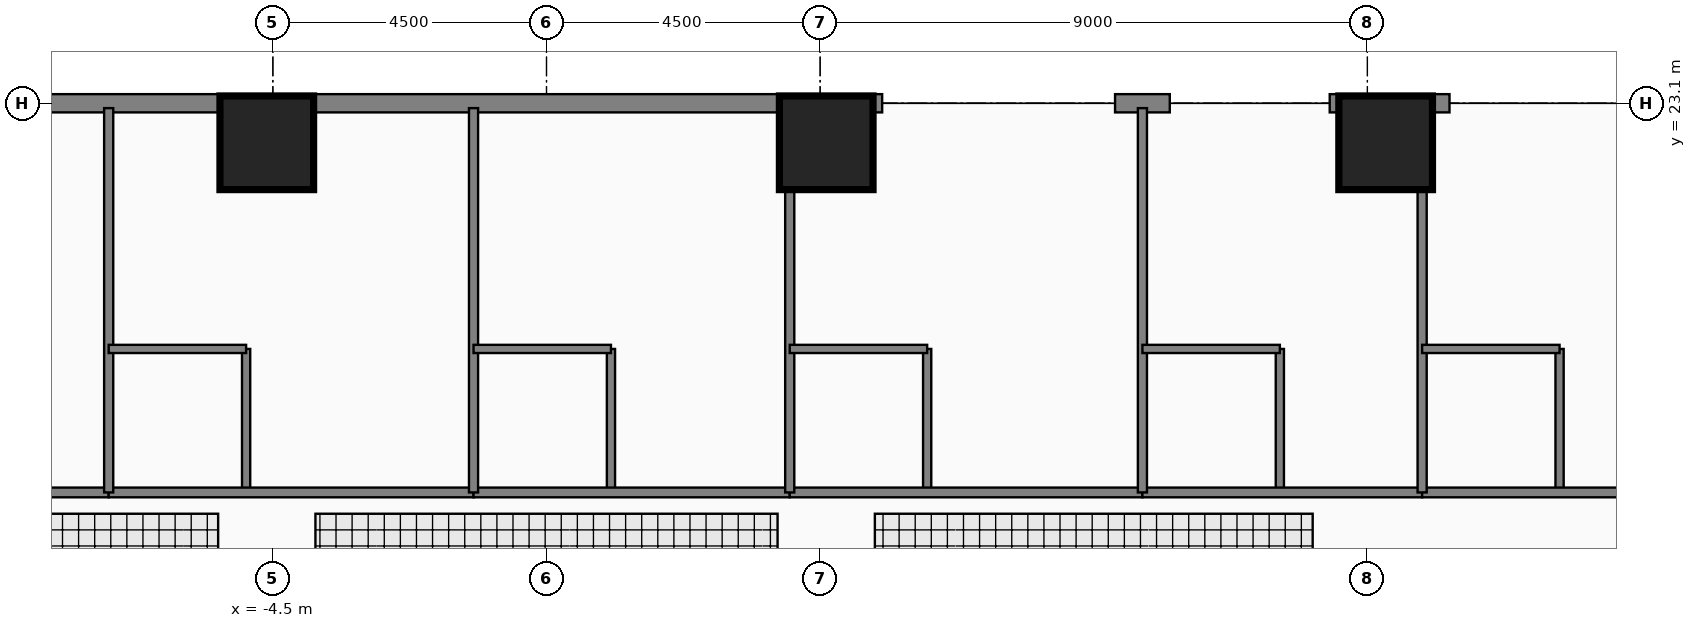
"""IFC4 building model, lengths in metres.
Left out: names, types, materials, properties, quantities, classifications, styles, units other than length and angle.
Written with IfcOpenShell. Run it as: python <this file> out.ifc"""

import sys

from ifc_helpers import new_model, si_unit, direction, frame, frame_2d, origin, origin_2d, place, context, subcontext, project, spatial, rectangle, extrude, element, fill, save


model = new_model("IFC4")
c1 = context("Model", 3, precision=1e-05, world=origin(), true_north=direction((0.0, 1.0)))
c2 = subcontext(c1, "Body", "Model", "MODEL_VIEW")
j1 = project(units=[si_unit("LENGTHUNIT", "METRE"), si_unit("PLANEANGLEUNIT", "RADIAN")], contexts=[c1])
p1 = place(None, origin())
s1 = spatial("IfcSite", under=j1, at=p1, CompositionType="ELEMENT")
p2 = place(p1, origin())
s2 = spatial("IfcBuilding", under=s1, at=p2, CompositionType="ELEMENT")
p3 = place(p2, frame((0.0, 0.0, 27.6)))
s3 = spatial("IfcBuildingStorey", under=s2, at=p3, CompositionType="ELEMENT", Elevation=27.6)
for number, where, z_axis, x_axis in (
    (1, (-4.6, 22.45, 0.0), (0.0, 0.0, 1.0), (1.0, 0.0, 0.0)),
    (2, (4.6, 22.45, 0.0), (0.0, 0.0, 1.0), (1.0, 0.0, 0.0)),
    (3, (13.8, 22.45, 0.0), (0.0, 0.0, 1.0), (1.0, 0.0, 0.0)),
):
    element("IfcColumn", number, at=place(p3, frame(where, z_axis=z_axis, x_axis=x_axis)), inside=s3, PredefinedType="COLUMN", context=c2, shape_type="SweptSolid", body=[
        extrude(rectangle(XDim=1.5, YDim=1.5, at=origin_2d()), origin(), (0.0, 0.0, 1.0), 3.65),
    ])
p4 = place(p3, frame((-14.72, 23.1, 0.0), z_axis=(0.0, 0.0, 1.0), x_axis=(1.0, 0.0, 0.0)))
e4 = element("IfcWall", 4, at=p4, inside=s3, PredefinedType="STANDARD", context=c2, shape_type="SweptSolid", body=[
    extrude(rectangle(XDim=20.24, YDim=0.3, at=frame_2d((10.12, 0.0))), origin(), (0.0, 0.0, 1.0), 3.43),
])
p5 = place(p4, frame((14.555, 0.0, 0.0)))
e5 = element("IfcOpeningElement", 5, at=p5, cuts=e4, PredefinedType="OPENING", context=c2, shape_type="SweptSolid", body=[
    extrude(rectangle(XDim=1.05, YDim=2.2, at=frame_2d((0.525, 1.1))), frame((0.0, 0.16, 0.0), z_axis=(0.0, -1.0, 0.0), x_axis=(1.0, 0.0, 0.0)), (0.0, 0.0, 1.0), 0.32),
])
p6 = place(p4, frame((4.668, 0.0, 0.85)))
e6 = element("IfcOpeningElement", 6, at=p6, cuts=e4, PredefinedType="OPENING", context=c2, shape_type="SweptSolid", body=[
    extrude(rectangle(XDim=1.6, YDim=1.8, at=frame_2d((0.8, 0.9))), frame((0.0, 0.16, 0.0), z_axis=(0.0, -1.0, 0.0), x_axis=(1.0, 0.0, 0.0)), (0.0, 0.0, 1.0), 0.32),
])
p7 = place(p4, frame((2.754, 0.0, 0.95)))
e7 = element("IfcOpeningElement", 7, at=p7, cuts=e4, PredefinedType="OPENING", context=c2, shape_type="SweptSolid", body=[
    extrude(rectangle(XDim=1.15, YDim=1.55, at=frame_2d((0.575, 0.775))), frame((0.0, 0.16, 0.0), z_axis=(0.0, -1.0, 0.0), x_axis=(1.0, 0.0, 0.0)), (0.0, 0.0, 1.0), 0.32),
])
p8 = place(p4, frame((7.955, 0.0, 0.95)))
e8 = element("IfcOpeningElement", 8, at=p8, cuts=e4, PredefinedType="OPENING", context=c2, shape_type="SweptSolid", body=[
    extrude(rectangle(XDim=1.15, YDim=1.55, at=frame_2d((0.575, 0.775))), frame((0.0, 0.16, 0.0), z_axis=(0.0, -1.0, 0.0), x_axis=(1.0, 0.0, 0.0)), (0.0, 0.0, 1.0), 0.32),
])
p9 = place(p4, frame((11.31, 0.0, 0.85)))
e9 = element("IfcOpeningElement", 9, at=p9, cuts=e4, PredefinedType="OPENING", context=c2, shape_type="SweptSolid", body=[
    extrude(rectangle(XDim=1.6, YDim=1.8, at=frame_2d((0.8, 0.9))), frame((0.0, 0.16, 0.0), z_axis=(0.0, -1.0, 0.0), x_axis=(1.0, 0.0, 0.0)), (0.0, 0.0, 1.0), 0.32),
])
p10 = place(p4, frame((16.427, 0.0, 0.85)))
e10 = element("IfcOpeningElement", 10, at=p10, cuts=e4, PredefinedType="OPENING", context=c2, shape_type="SweptSolid", body=[
    extrude(rectangle(XDim=1.6, YDim=1.8, at=frame_2d((0.8, 0.9))), frame((0.0, 0.16, 0.0), z_axis=(0.0, -1.0, 0.0), x_axis=(1.0, 0.0, 0.0)), (0.0, 0.0, 1.0), 0.32),
])
p11 = place(p3, frame((9.35, 23.1, 0.0), z_axis=(0.0, 0.0, 1.0), x_axis=(1.0, 0.0, 0.0)))
e11 = element("IfcWall", 11, at=p11, inside=s3, PredefinedType="STANDARD", context=c2, shape_type="SweptSolid", body=[
    extrude(rectangle(XDim=0.9, YDim=0.3, at=frame_2d((0.45, 0.0))), origin(), (0.0, 0.0, 1.0), 3.43),
])
p12 = place(p3, frame((12.88, 23.1, 0.0), z_axis=(0.0, 0.0, 1.0), x_axis=(1.0, 0.0, 0.0)))
e12 = element("IfcWall", 12, at=p12, inside=s3, PredefinedType="STANDARD", context=c2, shape_type="SweptSolid", body=[
    extrude(rectangle(XDim=1.97, YDim=0.3, at=frame_2d((0.985, 0.0))), origin(), (0.0, 0.0, 1.0), 3.43),
])
p13 = place(p3, frame((-12.6, 16.7, 0.0), z_axis=(0.0, 0.0, 1.0), x_axis=(1.0, 0.0, 0.0)))
e13 = element("IfcWall", 13, at=p13, inside=s3, PredefinedType="PARTITIONING", context=c2, shape_type="SweptSolid", body=[
    extrude(rectangle(XDim=5.4, YDim=0.16, at=frame_2d((2.7, 0.0))), origin(), (0.0, 0.0, 1.0), 2.973),
])
p14 = place(p13, frame((3.375, 0.0, 0.0)))
e14 = element("IfcOpeningElement", 14, at=p14, cuts=e13, PredefinedType="OPENING", context=c2, shape_type="SweptSolid", body=[
    extrude(rectangle(XDim=0.95, YDim=2.15, at=frame_2d((0.475, 1.075))), frame((0.0, 0.09, 0.0), z_axis=(0.0, -1.0, 0.0), x_axis=(1.0, 0.0, 0.0)), (0.0, 0.0, 1.0), 0.18),
])
p15 = place(p3, frame((-4.94, 16.7, 0.0), z_axis=(0.0, 0.0, 1.0), x_axis=(0.0, 1.0, 0.0)))
e15 = element("IfcWall", 15, at=p15, inside=s3, PredefinedType="PLUMBINGWALL", context=c2, shape_type="SweptSolid", body=[
    extrude(rectangle(XDim=2.36, YDim=0.135, at=frame_2d((1.18, 0.0))), origin(), (0.0, 0.0, 1.0), 2.668),
])
p16 = place(p15, frame((0.65, 0.0, 0.0)))
e16 = element("IfcOpeningElement", 16, at=p16, cuts=e15, PredefinedType="OPENING", context=c2, shape_type="SweptSolid", body=[
    extrude(rectangle(XDim=0.85, YDim=2.1, at=frame_2d((0.425, 1.05))), frame((0.0, 0.077, 0.0), z_axis=(0.0, -1.0, 0.0), x_axis=(1.0, 0.0, 0.0)), (0.0, 0.0, 1.0), 0.155),
])
p17 = place(p3, frame((-7.2, 16.7, 0.0), z_axis=(0.0, 0.0, 1.0), x_axis=(1.0, 0.0, 0.0)))
e17 = element("IfcWall", 17, at=p17, inside=s3, PredefinedType="PARTITIONING", context=c2, shape_type="SweptSolid", body=[
    extrude(rectangle(XDim=6.0, YDim=0.16, at=frame_2d((3.0, 0.0))), origin(), (0.0, 0.0, 1.0), 2.973),
])
p18 = place(p17, frame((3.675, 0.0, 0.0)))
e18 = element("IfcOpeningElement", 18, at=p18, cuts=e17, PredefinedType="OPENING", context=c2, shape_type="SweptSolid", body=[
    extrude(rectangle(XDim=0.95, YDim=2.15, at=frame_2d((0.475, 1.075))), frame((0.0, 0.09, 0.0), z_axis=(0.0, -1.0, 0.0), x_axis=(1.0, 0.0, 0.0)), (0.0, 0.0, 1.0), 0.18),
])
p19 = place(p3, frame((1.06, 16.7, 0.0), z_axis=(0.0, 0.0, 1.0), x_axis=(0.0, 1.0, 0.0)))
e19 = element("IfcWall", 19, at=p19, inside=s3, PredefinedType="PLUMBINGWALL", context=c2, shape_type="SweptSolid", body=[
    extrude(rectangle(XDim=2.36, YDim=0.135, at=frame_2d((1.18, 0.0))), origin(), (0.0, 0.0, 1.0), 3.43),
])
p20 = place(p19, frame((0.65, 0.0, 0.0)))
e20 = element("IfcOpeningElement", 20, at=p20, cuts=e19, PredefinedType="OPENING", context=c2, shape_type="SweptSolid", body=[
    extrude(rectangle(XDim=0.85, YDim=2.1, at=frame_2d((0.425, 1.05))), frame((0.0, 0.077, 0.0), z_axis=(0.0, -1.0, 0.0), x_axis=(1.0, 0.0, 0.0)), (0.0, 0.0, 1.0), 0.155),
])
p21 = place(p3, frame((-1.2, 16.7, 0.0), z_axis=(0.0, 0.0, 1.0), x_axis=(1.0, 0.0, 0.0)))
e21 = element("IfcWall", 21, at=p21, inside=s3, PredefinedType="PARTITIONING", context=c2, shape_type="SweptSolid", body=[
    extrude(rectangle(XDim=5.2, YDim=0.16, at=frame_2d((2.6, 0.0))), origin(), (0.0, 0.0, 1.0), 2.973),
])
p22 = place(p21, frame((3.275, 0.0, 0.0)))
e22 = element("IfcOpeningElement", 22, at=p22, cuts=e21, PredefinedType="OPENING", context=c2, shape_type="SweptSolid", body=[
    extrude(rectangle(XDim=0.95, YDim=2.15, at=frame_2d((0.475, 1.075))), frame((0.0, 0.09, 0.0), z_axis=(0.0, -1.0, 0.0), x_axis=(1.0, 0.0, 0.0)), (0.0, 0.0, 1.0), 0.18),
])
p23 = place(p3, frame((6.26, 16.7, 0.0), z_axis=(0.0, 0.0, 1.0), x_axis=(0.0, 1.0, 0.0)))
e23 = element("IfcWall", 23, at=p23, inside=s3, PredefinedType="PLUMBINGWALL", context=c2, shape_type="SweptSolid", body=[
    extrude(rectangle(XDim=2.36, YDim=0.135, at=frame_2d((1.18, 0.0))), origin(), (0.0, 0.0, 1.0), 3.43),
])
p24 = place(p23, frame((0.65, 0.0, 0.0)))
e24 = element("IfcOpeningElement", 24, at=p24, cuts=e23, PredefinedType="OPENING", context=c2, shape_type="SweptSolid", body=[
    extrude(rectangle(XDim=0.85, YDim=2.1, at=frame_2d((0.425, 1.05))), frame((0.0, 0.077, 0.0), z_axis=(0.0, -1.0, 0.0), x_axis=(1.0, 0.0, 0.0)), (0.0, 0.0, 1.0), 0.155),
])
p25 = place(p3, frame((4.0, 16.7, 0.0), z_axis=(0.0, 0.0, 1.0), x_axis=(1.0, 0.0, 0.0)))
e25 = element("IfcWall", 25, at=p25, inside=s3, PredefinedType="PARTITIONING", context=c2, shape_type="SweptSolid", body=[
    extrude(rectangle(XDim=5.8, YDim=0.16, at=frame_2d((2.9, 0.0))), origin(), (0.0, 0.0, 1.0), 2.973),
])
p26 = place(p25, frame((3.575, 0.0, 0.0)))
e26 = element("IfcOpeningElement", 26, at=p26, cuts=e25, PredefinedType="OPENING", context=c2, shape_type="SweptSolid", body=[
    extrude(rectangle(XDim=0.95, YDim=2.15, at=frame_2d((0.475, 1.075))), frame((0.0, 0.09, 0.0), z_axis=(0.0, -1.0, 0.0), x_axis=(1.0, 0.0, 0.0)), (0.0, 0.0, 1.0), 0.18),
])
p27 = place(p3, frame((12.06, 16.7, 0.0), z_axis=(0.0, 0.0, 1.0), x_axis=(0.0, 1.0, 0.0)))
e27 = element("IfcWall", 27, at=p27, inside=s3, PredefinedType="PLUMBINGWALL", context=c2, shape_type="SweptSolid", body=[
    extrude(rectangle(XDim=2.36, YDim=0.135, at=frame_2d((1.18, 0.0))), origin(), (0.0, 0.0, 1.0), 3.43),
])
p28 = place(p27, frame((0.65, 0.0, 0.0)))
e28 = element("IfcOpeningElement", 28, at=p28, cuts=e27, PredefinedType="OPENING", context=c2, shape_type="SweptSolid", body=[
    extrude(rectangle(XDim=0.85, YDim=2.1, at=frame_2d((0.425, 1.05))), frame((0.0, 0.077, 0.0), z_axis=(0.0, -1.0, 0.0), x_axis=(1.0, 0.0, 0.0)), (0.0, 0.0, 1.0), 0.155),
])
p29 = place(p3, frame((9.8, 16.7, 0.0), z_axis=(0.0, 0.0, 1.0), x_axis=(1.0, 0.0, 0.0)))
e29 = element("IfcWall", 29, at=p29, inside=s3, PredefinedType="PARTITIONING", context=c2, shape_type="SweptSolid", body=[
    extrude(rectangle(XDim=4.6, YDim=0.16, at=frame_2d((2.3, 0.0))), origin(), (0.0, 0.0, 1.0), 2.973),
])
p30 = place(p29, frame((2.975, 0.0, 0.0)))
e30 = element("IfcOpeningElement", 30, at=p30, cuts=e29, PredefinedType="OPENING", context=c2, shape_type="SweptSolid", body=[
    extrude(rectangle(XDim=0.95, YDim=2.15, at=frame_2d((0.475, 1.075))), frame((0.0, 0.09, 0.0), z_axis=(0.0, -1.0, 0.0), x_axis=(1.0, 0.0, 0.0)), (0.0, 0.0, 1.0), 0.18),
])
p31 = place(p3, frame((16.66, 16.7, 0.0), z_axis=(0.0, 0.0, 1.0), x_axis=(0.0, 1.0, 0.0)))
e31 = element("IfcWall", 31, at=p31, inside=s3, PredefinedType="PLUMBINGWALL", context=c2, shape_type="SweptSolid", body=[
    extrude(rectangle(XDim=2.36, YDim=0.135, at=frame_2d((1.18, 0.0))), origin(), (0.0, 0.0, 1.0), 3.43),
])
p32 = place(p31, frame((0.65, 0.0, 0.0)))
e32 = element("IfcOpeningElement", 32, at=p32, cuts=e31, PredefinedType="OPENING", context=c2, shape_type="SweptSolid", body=[
    extrude(rectangle(XDim=0.85, YDim=2.1, at=frame_2d((0.425, 1.05))), frame((0.0, 0.077, 0.0), z_axis=(0.0, -1.0, 0.0), x_axis=(1.0, 0.0, 0.0)), (0.0, 0.0, 1.0), 0.155),
])
p33 = place(p3, frame((14.4, 16.7, 0.0), z_axis=(0.0, 0.0, 1.0), x_axis=(1.0, 0.0, 0.0)))
e33 = element("IfcWall", 33, at=p33, inside=s3, PredefinedType="PARTITIONING", context=c2, shape_type="SweptSolid", body=[
    extrude(rectangle(XDim=11.24, YDim=0.16, at=frame_2d((5.62, 0.0))), origin(), (0.0, 0.0, 1.0), 3.43),
])
p34 = place(p33, frame((6.27, 0.0, 0.0)))
e34 = element("IfcOpeningElement", 34, at=p34, cuts=e33, PredefinedType="OPENING", context=c2, shape_type="SweptSolid", body=[
    extrude(rectangle(XDim=1.0, YDim=2.15, at=frame_2d((0.5, 1.075))), frame((0.0, 0.09, 0.0), z_axis=(0.0, -1.0, 0.0), x_axis=(1.0, 0.0, 0.0)), (0.0, 0.0, 1.0), 0.18),
])
p35 = place(p3, frame((-7.2, 16.7, 0.0), z_axis=(0.0, 0.0, 1.0), x_axis=(0.0, 1.0, 0.0)))
e35 = element("IfcWall", 35, at=p35, inside=s3, PredefinedType="PARTITIONING", context=c2, shape_type="SweptSolid", body=[
    extrude(rectangle(XDim=6.32, YDim=0.15, at=frame_2d((3.16, 0.0))), origin(), (0.0, 0.0, 1.0), 3.43),
])
p36 = place(p3, frame((-7.2, 19.06, 0.0), z_axis=(0.0, 0.0, 1.0), x_axis=(1.0, 0.0, 0.0)))
e36 = element("IfcWall", 36, at=p36, inside=s3, PredefinedType="PLUMBINGWALL", context=c2, shape_type="SweptSolid", body=[
    extrude(rectangle(XDim=2.26, YDim=0.135, at=frame_2d((1.13, 0.0))), origin(), (0.0, 0.0, 1.0), 2.973),
])
p37 = place(p3, frame((-1.2, 16.7, 0.0), z_axis=(0.0, 0.0, 1.0), x_axis=(0.0, 1.0, 0.0)))
e37 = element("IfcWall", 37, at=p37, inside=s3, PredefinedType="PARTITIONING", context=c2, shape_type="SweptSolid", body=[
    extrude(rectangle(XDim=6.32, YDim=0.15, at=frame_2d((3.16, 0.0))), origin(), (0.0, 0.0, 1.0), 3.43),
])
p38 = place(p3, frame((-1.2, 19.06, 0.0), z_axis=(0.0, 0.0, 1.0), x_axis=(1.0, 0.0, 0.0)))
e38 = element("IfcWall", 38, at=p38, inside=s3, PredefinedType="PLUMBINGWALL", context=c2, shape_type="SweptSolid", body=[
    extrude(rectangle(XDim=2.26, YDim=0.135, at=frame_2d((1.13, 0.0))), origin(), (0.0, 0.0, 1.0), 2.973),
])
p39 = place(p3, frame((4.0, 16.7, 0.0), z_axis=(0.0, 0.0, 1.0), x_axis=(0.0, 1.0, 0.0)))
e39 = element("IfcWall", 39, at=p39, inside=s3, PredefinedType="PARTITIONING", context=c2, shape_type="SweptSolid", body=[
    extrude(rectangle(XDim=6.32, YDim=0.15, at=frame_2d((3.16, 0.0))), origin(), (0.0, 0.0, 1.0), 3.43),
])
p40 = place(p3, frame((4.0, 19.06, 0.0), z_axis=(0.0, 0.0, 1.0), x_axis=(1.0, 0.0, 0.0)))
e40 = element("IfcWall", 40, at=p40, inside=s3, PredefinedType="PLUMBINGWALL", context=c2, shape_type="SweptSolid", body=[
    extrude(rectangle(XDim=2.26, YDim=0.135, at=frame_2d((1.13, 0.0))), origin(), (0.0, 0.0, 1.0), 2.973),
])
p41 = place(p3, frame((9.8, 16.7, 0.0), z_axis=(0.0, 0.0, 1.0), x_axis=(0.0, 1.0, 0.0)))
e41 = element("IfcWall", 41, at=p41, inside=s3, PredefinedType="PARTITIONING", context=c2, shape_type="SweptSolid", body=[
    extrude(rectangle(XDim=6.32, YDim=0.15, at=frame_2d((3.16, 0.0))), origin(), (0.0, 0.0, 1.0), 3.43),
])
p42 = place(p3, frame((9.8, 19.06, 0.0), z_axis=(0.0, 0.0, 1.0), x_axis=(1.0, 0.0, 0.0)))
e42 = element("IfcWall", 42, at=p42, inside=s3, PredefinedType="PLUMBINGWALL", context=c2, shape_type="SweptSolid", body=[
    extrude(rectangle(XDim=2.26, YDim=0.135, at=frame_2d((1.13, 0.0))), origin(), (0.0, 0.0, 1.0), 2.973),
])
p43 = place(p3, frame((14.4, 16.7, 0.0), z_axis=(0.0, 0.0, 1.0), x_axis=(0.0, 1.0, 0.0)))
e43 = element("IfcWall", 43, at=p43, inside=s3, PredefinedType="PARTITIONING", context=c2, shape_type="SweptSolid", body=[
    extrude(rectangle(XDim=6.32, YDim=0.15, at=frame_2d((3.16, 0.0))), origin(), (0.0, 0.0, 1.0), 3.43),
])
p44 = place(p3, frame((14.4, 19.06, 0.0), z_axis=(0.0, 0.0, 1.0), x_axis=(1.0, 0.0, 0.0)))
e44 = element("IfcWall", 44, at=p44, inside=s3, PredefinedType="PLUMBINGWALL", context=c2, shape_type="SweptSolid", body=[
    extrude(rectangle(XDim=2.26, YDim=0.135, at=frame_2d((1.13, 0.0))), origin(), (0.0, 0.0, 1.0), 3.43),
])
p45 = place(p5, origin())
e45 = element("IfcDoor", 45, at=p45, inside=s3, OperationType="SINGLE_SWING_LEFT", PredefinedType="DOOR", context=c2, shape_type="SweptSolid", body=[
    extrude(rectangle(XDim=1.05, YDim=2.2, at=frame_2d((0.525, 1.1))), frame((0.0, 0.025, 0.0), z_axis=(0.0, -1.0, 0.0), x_axis=(1.0, 0.0, 0.0)), (0.0, 0.0, 1.0), 0.05),
])
fill(e5, e45)
p46 = place(p8, origin())
e46 = element("IfcWindow", 46, at=p46, inside=s3, PartitioningType="SINGLE_PANEL", PredefinedType="WINDOW", context=c2, shape_type="SweptSolid", body=[
    extrude(rectangle(XDim=1.15, YDim=1.55, at=frame_2d((0.575, 0.775))), frame((0.0, 0.03, 0.0), z_axis=(0.0, -1.0, 0.0), x_axis=(1.0, 0.0, 0.0)), (0.0, 0.0, 1.0), 0.06),
])
fill(e8, e46)
p47 = place(p9, origin())
e47 = element("IfcWindow", 47, at=p47, inside=s3, PartitioningType="SINGLE_PANEL", PredefinedType="WINDOW", context=c2, shape_type="SweptSolid", body=[
    extrude(rectangle(XDim=1.6, YDim=1.8, at=frame_2d((0.8, 0.9))), frame((0.0, 0.03, 0.0), z_axis=(0.0, -1.0, 0.0), x_axis=(1.0, 0.0, 0.0)), (0.0, 0.0, 1.0), 0.06),
])
fill(e9, e47)
p48 = place(p10, origin())
e48 = element("IfcWindow", 48, at=p48, inside=s3, PartitioningType="SINGLE_PANEL", PredefinedType="WINDOW", context=c2, shape_type="SweptSolid", body=[
    extrude(rectangle(XDim=1.6, YDim=1.8, at=frame_2d((0.8, 0.9))), frame((0.0, 0.03, 0.0), z_axis=(0.0, -1.0, 0.0), x_axis=(1.0, 0.0, 0.0)), (0.0, 0.0, 1.0), 0.06),
])
fill(e10, e48)
p49 = place(p16, origin())
e49 = element("IfcDoor", 49, at=p49, inside=s3, OperationType="SINGLE_SWING_LEFT", PredefinedType="DOOR", context=c2, shape_type="SweptSolid", body=[
    extrude(rectangle(XDim=0.85, YDim=2.1, at=frame_2d((0.425, 1.05))), frame((0.0, 0.025, 0.0), z_axis=(0.0, -1.0, 0.0), x_axis=(1.0, 0.0, 0.0)), (0.0, 0.0, 1.0), 0.05),
])
fill(e16, e49)
p50 = place(p18, origin())
e50 = element("IfcDoor", 50, at=p50, inside=s3, OperationType="SINGLE_SWING_RIGHT", PredefinedType="DOOR", context=c2, shape_type="SweptSolid", body=[
    extrude(rectangle(XDim=0.95, YDim=2.15, at=frame_2d((0.475, 1.075))), frame((0.0, 0.025, 0.0), z_axis=(0.0, -1.0, 0.0), x_axis=(1.0, 0.0, 0.0)), (0.0, 0.0, 1.0), 0.05),
])
fill(e18, e50)
p51 = place(p20, origin())
e51 = element("IfcDoor", 51, at=p51, inside=s3, OperationType="SINGLE_SWING_LEFT", PredefinedType="DOOR", context=c2, shape_type="SweptSolid", body=[
    extrude(rectangle(XDim=0.85, YDim=2.1, at=frame_2d((0.425, 1.05))), frame((0.0, 0.025, 0.0), z_axis=(0.0, -1.0, 0.0), x_axis=(1.0, 0.0, 0.0)), (0.0, 0.0, 1.0), 0.05),
])
fill(e20, e51)
p52 = place(p22, origin())
e52 = element("IfcDoor", 52, at=p52, inside=s3, OperationType="SINGLE_SWING_RIGHT", PredefinedType="DOOR", context=c2, shape_type="SweptSolid", body=[
    extrude(rectangle(XDim=0.95, YDim=2.15, at=frame_2d((0.475, 1.075))), frame((0.0, 0.025, 0.0), z_axis=(0.0, -1.0, 0.0), x_axis=(1.0, 0.0, 0.0)), (0.0, 0.0, 1.0), 0.05),
])
fill(e22, e52)
p53 = place(p24, origin())
e53 = element("IfcDoor", 53, at=p53, inside=s3, OperationType="SINGLE_SWING_LEFT", PredefinedType="DOOR", context=c2, shape_type="SweptSolid", body=[
    extrude(rectangle(XDim=0.85, YDim=2.1, at=frame_2d((0.425, 1.05))), frame((0.0, 0.025, 0.0), z_axis=(0.0, -1.0, 0.0), x_axis=(1.0, 0.0, 0.0)), (0.0, 0.0, 1.0), 0.05),
])
fill(e24, e53)
p54 = place(p26, origin())
e54 = element("IfcDoor", 54, at=p54, inside=s3, OperationType="SINGLE_SWING_RIGHT", PredefinedType="DOOR", context=c2, shape_type="SweptSolid", body=[
    extrude(rectangle(XDim=0.95, YDim=2.15, at=frame_2d((0.475, 1.075))), frame((0.0, 0.025, 0.0), z_axis=(0.0, -1.0, 0.0), x_axis=(1.0, 0.0, 0.0)), (0.0, 0.0, 1.0), 0.05),
])
fill(e26, e54)
p55 = place(p28, origin())
e55 = element("IfcDoor", 55, at=p55, inside=s3, OperationType="SINGLE_SWING_LEFT", PredefinedType="DOOR", context=c2, shape_type="SweptSolid", body=[
    extrude(rectangle(XDim=0.85, YDim=2.1, at=frame_2d((0.425, 1.05))), frame((0.0, 0.025, 0.0), z_axis=(0.0, -1.0, 0.0), x_axis=(1.0, 0.0, 0.0)), (0.0, 0.0, 1.0), 0.05),
])
fill(e28, e55)
p56 = place(p30, origin())
e56 = element("IfcDoor", 56, at=p56, inside=s3, OperationType="SINGLE_SWING_RIGHT", PredefinedType="DOOR", context=c2, shape_type="SweptSolid", body=[
    extrude(rectangle(XDim=0.95, YDim=2.15, at=frame_2d((0.475, 1.075))), frame((0.0, 0.025, 0.0), z_axis=(0.0, -1.0, 0.0), x_axis=(1.0, 0.0, 0.0)), (0.0, 0.0, 1.0), 0.05),
])
fill(e30, e56)
p57 = place(p32, origin())
e57 = element("IfcDoor", 57, at=p57, inside=s3, OperationType="SINGLE_SWING_LEFT", PredefinedType="DOOR", context=c2, shape_type="SweptSolid", body=[
    extrude(rectangle(XDim=0.85, YDim=2.1, at=frame_2d((0.425, 1.05))), frame((0.0, 0.025, 0.0), z_axis=(0.0, -1.0, 0.0), x_axis=(1.0, 0.0, 0.0)), (0.0, 0.0, 1.0), 0.05),
])
fill(e32, e57)
save(model, sys.argv[1])
